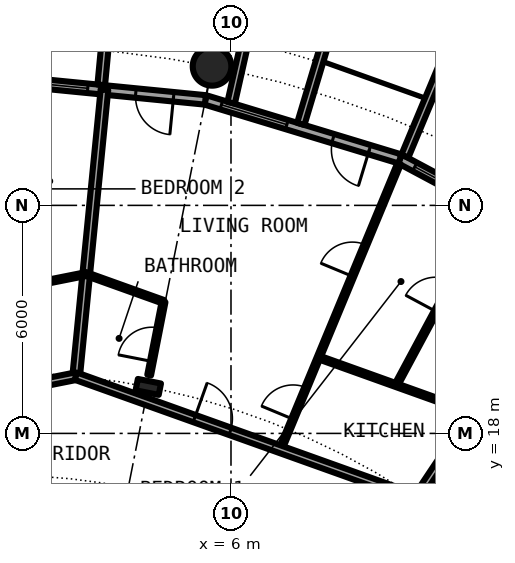
"""IFC4 building model, lengths in metres.
Left out: names, types, materials, properties, quantities, classifications, styles, units other than length and angle.
Written with IfcOpenShell. Run it as: python <this file> out.ifc"""

import sys

from ifc_helpers import new_model, si_unit, direction, frame, frame_2d, origin, origin_2d, place, context, subcontext, project, spatial, rectangle, hollow_circle, i_section, extrude, element, fill, save


model = new_model("IFC4")
c1 = context("Model", 3, precision=1e-05, world=origin(), true_north=direction((0.0, 1.0)))
c2 = subcontext(c1, "Body", "Model", "MODEL_VIEW")
j1 = project(units=[si_unit("LENGTHUNIT", "METRE"), si_unit("PLANEANGLEUNIT", "RADIAN")], contexts=[c1])
p1 = place(None, origin())
s1 = spatial("IfcSite", under=j1, at=p1, CompositionType="ELEMENT")
p2 = place(p1, origin())
s2 = spatial("IfcBuilding", under=s1, at=p2, CompositionType="ELEMENT")
p3 = place(p2, frame((0.0, 0.0, 35.0)))
s3 = spatial("IfcBuildingStorey", under=s2, at=p3, CompositionType="ELEMENT", Elevation=35.0)
p4 = place(p3, frame((5.501, 27.658, 0.0), z_axis=(0.0, 0.0, 1.0), x_axis=(1.0, 0.0, 0.0)))
e1 = element("IfcColumn", 1, at=p4, inside=s3, PredefinedType="COLUMN", context=c2, shape_type="SweptSolid", body=[
    extrude(hollow_circle(Radius=0.508, WallThickness=0.05, at=origin_2d()), origin(), (0.0, 0.0, 1.0), 3.05),
])
p5 = place(p3, frame((3.824, 19.223, 0.0), z_axis=(0.0, 0.0, 1.0), x_axis=(0.195090322016, 0.980785280403, 0.0)))
e2 = element("IfcColumn", 2, at=p5, inside=s3, PredefinedType="COLUMN", context=c2, shape_type="SweptSolid", body=[
    extrude(i_section(OverallWidth=0.305, OverallDepth=0.62, WebThickness=0.021, FlangeThickness=0.04, FilletRadius=0.027, at=origin_2d()), origin(), (0.0, 0.0, 1.0), 3.05),
])
p6 = place(p3, frame((15.167, 22.699, 0.0), z_axis=(0.0, 0.0, 1.0), x_axis=(-0.881915646801, 0.471407246368, 0.0)))
e3 = element("IfcWall", 3, at=p6, inside=s3, PredefinedType="SOLIDWALL", context=c2, shape_type="SweptSolid", body=[
    extrude(rectangle(XDim=5.352, YDim=0.25, at=frame_2d((2.676, 0.0))), origin(), (0.0, 0.0, 1.0), 2.7),
])
p7 = place(p6, frame((0.841, 0.0, 0.0)))
e4 = element("IfcOpeningElement", 4, at=p7, cuts=e3, PredefinedType="OPENING", context=c2, shape_type="SweptSolid", body=[
    extrude(rectangle(XDim=1.0, YDim=2.2, at=frame_2d((0.5, 1.1))), frame((0.0, 0.135, 0.0), z_axis=(0.0, -1.0, 0.0), x_axis=(1.0, 0.0, 0.0)), (0.0, 0.0, 1.0), 0.27),
])
p8 = place(p6, frame((3.111, 0.0, 0.3)))
e5 = element("IfcOpeningElement", 5, at=p8, cuts=e3, PredefinedType="OPENING", context=c2, shape_type="SweptSolid", body=[
    extrude(rectangle(XDim=1.8, YDim=2.1, at=frame_2d((0.9, 1.05))), frame((0.0, 0.135, 0.0), z_axis=(0.0, -1.0, 0.0), x_axis=(1.0, 0.0, 0.0)), (0.0, 0.0, 1.0), 0.27),
])
p9 = place(p3, frame((10.575, 25.295, -0.03), z_axis=(0.0, 0.0, 1.0), x_axis=(0.385697364644, 0.922625353492, 0.0)))
e6 = element("IfcWall", 6, at=p9, inside=s3, PredefinedType="SOLIDWALL", context=c2, shape_type="SweptSolid", body=[
    extrude(rectangle(XDim=2.883, YDim=0.2, at=frame_2d((1.442, 0.0))), origin(), (0.0, 0.0, 1.0), 2.73),
])
p10 = place(p3, frame((10.447, 25.222, 0.0), z_axis=(0.0, 0.0, 1.0), x_axis=(-0.956965678721, 0.290201119486, 0.0)))
e7 = element("IfcWall", 7, at=p10, inside=s3, PredefinedType="SOLIDWALL", context=c2, shape_type="SweptSolid", body=[
    extrude(rectangle(XDim=5.351, YDim=0.25, at=frame_2d((2.676, 0.0))), origin(), (0.0, 0.0, 1.0), 2.7),
])
p11 = place(p10, frame((0.841, 0.0, 0.0)))
e8 = element("IfcOpeningElement", 8, at=p11, cuts=e7, PredefinedType="OPENING", context=c2, shape_type="SweptSolid", body=[
    extrude(rectangle(XDim=1.0, YDim=2.2, at=frame_2d((0.5, 1.1))), frame((0.0, 0.135, 0.0), z_axis=(0.0, -1.0, 0.0), x_axis=(1.0, 0.0, 0.0)), (0.0, 0.0, 1.0), 0.27),
])
p12 = place(p10, frame((3.111, 0.0, 0.3)))
e9 = element("IfcOpeningElement", 9, at=p12, cuts=e7, PredefinedType="OPENING", context=c2, shape_type="SweptSolid", body=[
    extrude(rectangle(XDim=1.8, YDim=2.1, at=frame_2d((0.9, 1.05))), frame((0.0, 0.135, 0.0), z_axis=(0.0, -1.0, 0.0), x_axis=(1.0, 0.0, 0.0)), (0.0, 0.0, 1.0), 0.27),
])
p13 = place(p3, frame((7.837, 26.144, -0.03), z_axis=(0.0, 0.0, 1.0), x_axis=(0.287064767992, 0.957911174889, 0.0)))
e10 = element("IfcWall", 10, at=p13, inside=s3, PredefinedType="SOLIDWALL", context=c2, shape_type="SweptSolid", body=[
    extrude(rectangle(XDim=3.006, YDim=0.2, at=frame_2d((1.503, 0.0))), origin(), (0.0, 0.0, 1.0), 2.73),
])
p14 = place(p3, frame((6.004, 26.7, -0.03), z_axis=(0.0, 0.0, 1.0), x_axis=(0.219609259383, 0.975587911566, 0.0)))
e11 = element("IfcWall", 11, at=p14, inside=s3, PredefinedType="SOLIDWALL", context=c2, shape_type="SweptSolid", body=[
    extrude(rectangle(XDim=2.933, YDim=0.2, at=frame_2d((1.466, 0.0))), origin(), (0.0, 0.0, 1.0), 2.73),
])
p15 = place(p3, frame((5.326, 26.775, 0.0), z_axis=(0.0, 0.0, 1.0), x_axis=(-0.995173996315, 0.098126026407, 0.0)))
e12 = element("IfcWall", 12, at=p15, inside=s3, PredefinedType="SOLIDWALL", context=c2, shape_type="SweptSolid", body=[
    extrude(rectangle(XDim=5.352, YDim=0.25, at=frame_2d((2.676, 0.0))), origin(), (0.0, 0.0, 1.0), 2.7),
])
p16 = place(p15, frame((0.841, 0.0, 0.0)))
e13 = element("IfcOpeningElement", 13, at=p16, cuts=e12, PredefinedType="OPENING", context=c2, shape_type="SweptSolid", body=[
    extrude(rectangle(XDim=1.0, YDim=2.2, at=frame_2d((0.5, 1.1))), frame((0.0, 0.135, 0.0), z_axis=(0.0, -1.0, 0.0), x_axis=(1.0, 0.0, 0.0)), (0.0, 0.0, 1.0), 0.27),
])
p17 = place(p15, frame((3.111, 0.0, 0.3)))
e14 = element("IfcOpeningElement", 14, at=p17, cuts=e12, PredefinedType="OPENING", context=c2, shape_type="SweptSolid", body=[
    extrude(rectangle(XDim=1.8, YDim=2.1, at=frame_2d((0.9, 1.05))), frame((0.0, 0.135, 0.0), z_axis=(0.0, -1.0, 0.0), x_axis=(1.0, 0.0, 0.0)), (0.0, 0.0, 1.0), 0.27),
])
p18 = place(p3, frame((2.586, 27.171, -0.03), z_axis=(0.0, 0.0, 1.0), x_axis=(0.094548432284, 0.995520262954, 0.0)))
e15 = element("IfcWall", 15, at=p18, inside=s3, PredefinedType="SOLIDWALL", context=c2, shape_type="SweptSolid", body=[
    extrude(rectangle(XDim=3.006, YDim=0.2, at=frame_2d((1.503, 0.0))), origin(), (0.0, 0.0, 1.0), 2.73),
])
p19 = place(p3, frame((1.926, 19.505, 0.0), z_axis=(0.0, 0.0, 1.0), x_axis=(0.098208010272, 0.995165909142, 0.0)))
e16 = element("IfcWall", 16, at=p19, inside=s3, PredefinedType="PARTITIONING", context=c2, shape_type="SweptSolid", body=[
    extrude(rectangle(XDim=7.575, YDim=0.2, at=frame_2d((3.787, 0.0))), origin(), (0.0, 0.0, 1.0), 2.7),
])
p20 = place(p3, frame((3.847, 19.535, 0.0), z_axis=(0.0, 0.0, 1.0), x_axis=(0.193055213522, 0.981187894611, 0.0)))
e17 = element("IfcWall", 17, at=p20, inside=s3, PredefinedType="PARTITIONING", context=c2, shape_type="SweptSolid", body=[
    extrude(rectangle(XDim=1.964, YDim=0.1, at=frame_2d((0.982, 0.0))), origin(), (0.0, 0.0, 1.0), 2.7),
])
p21 = place(p20, frame((0.366, 0.0, 0.0)))
e18 = element("IfcOpeningElement", 18, at=p21, cuts=e17, PredefinedType="OPENING", context=c2, shape_type="SweptSolid", body=[
    extrude(rectangle(XDim=0.9, YDim=2.3, at=frame_2d((0.45, 1.15))), frame((0.0, 0.06, 0.0), z_axis=(0.0, -1.0, 0.0), x_axis=(1.0, 0.0, 0.0)), (0.0, 0.0, 1.0), 0.12),
])
p22 = place(p3, frame((7.302, 17.58, 0.0), z_axis=(0.0, 0.0, 1.0), x_axis=(0.383616168183, 0.923492628833, 0.0)))
e19 = element("IfcWall", 19, at=p22, inside=s3, PredefinedType="PARTITIONING", context=c2, shape_type="SweptSolid", body=[
    extrude(rectangle(XDim=8.138, YDim=0.1, at=frame_2d((4.069, 0.0))), origin(), (0.0, 0.0, 1.0), 2.7),
])
p23 = place(p22, frame((0.861, 0.0, 0.0)))
e20 = element("IfcOpeningElement", 20, at=p23, cuts=e19, PredefinedType="OPENING", context=c2, shape_type="SweptSolid", body=[
    extrude(rectangle(XDim=0.9, YDim=2.3, at=frame_2d((0.45, 1.15))), frame((0.0, 0.06, 0.0), z_axis=(0.0, -1.0, 0.0), x_axis=(1.0, 0.0, 0.0)), (0.0, 0.0, 1.0), 0.12),
])
p24 = place(p22, frame((4.931, 0.0, 0.0)))
e21 = element("IfcOpeningElement", 21, at=p24, cuts=e19, PredefinedType="OPENING", context=c2, shape_type="SweptSolid", body=[
    extrude(rectangle(XDim=0.9, YDim=2.3, at=frame_2d((0.45, 1.15))), frame((0.0, 0.06, 0.0), z_axis=(0.0, -1.0, 0.0), x_axis=(1.0, 0.0, 0.0)), (0.0, 0.0, 1.0), 0.12),
])
p25 = place(p3, frame((10.349, 19.272, 0.0), z_axis=(0.0, 0.0, 1.0), x_axis=(0.472967735543, 0.881079747319, 0.0)))
e22 = element("IfcWall", 22, at=p25, inside=s3, PredefinedType="PARTITIONING", context=c2, shape_type="SweptSolid", body=[
    extrude(rectangle(XDim=5.3, YDim=0.1, at=frame_2d((2.65, 0.0))), origin(), (0.0, 0.0, 1.0), 2.7),
])
p26 = place(p25, frame((2.2, 0.0, 0.0)))
e23 = element("IfcOpeningElement", 23, at=p26, cuts=e22, PredefinedType="OPENING", context=c2, shape_type="SweptSolid", body=[
    extrude(rectangle(XDim=0.9, YDim=2.3, at=frame_2d((0.45, 1.15))), frame((0.0, 0.06, 0.0), z_axis=(0.0, -1.0, 0.0), x_axis=(1.0, 0.0, 0.0)), (0.0, 0.0, 1.0), 0.12),
])
p27 = place(p3, frame((11.061, 16.555, 0.0), z_axis=(0.0, 0.0, 1.0), x_axis=(0.555576285599, 0.831465568067, 0.0)))
e24 = element("IfcWall", 24, at=p27, inside=s3, PredefinedType="PARTITIONING", context=c2, shape_type="SweptSolid", body=[
    extrude(rectangle(XDim=7.264, YDim=0.2, at=frame_2d((3.632, 0.0))), origin(), (0.0, 0.0, 1.0), 2.7),
])
p28 = place(p3, frame((-9.239, 17.286, 0.0), z_axis=(0.0, 0.0, 1.0), x_axis=(0.98077905287, 0.195121627328, 0.0)))
e25 = element("IfcWall", 25, at=p28, inside=s3, PredefinedType="PARTITIONING", context=c2, shape_type="SweptSolid", body=[
    extrude(rectangle(XDim=11.379, YDim=0.2, at=frame_2d((5.689, 0.0))), origin(), (0.0, 0.0, 1.0), 2.38),
])
p29 = place(p28, frame((3.293, 0.0, 0.0)))
e26 = element("IfcOpeningElement", 26, at=p29, cuts=e25, PredefinedType="OPENING", context=c2, shape_type="SweptSolid", body=[
    extrude(rectangle(XDim=1.0, YDim=2.3, at=frame_2d((0.5, 1.15))), frame((0.0, 0.11, 0.0), z_axis=(0.0, -1.0, 0.0), x_axis=(1.0, 0.0, 0.0)), (0.0, 0.0, 1.0), 0.22),
])
p30 = place(p3, frame((1.918, 19.506, 0.0), z_axis=(0.0, 0.0, 1.0), x_axis=(0.941574977747, -0.336803446065, 0.0)))
e27 = element("IfcWall", 27, at=p30, inside=s3, PredefinedType="PARTITIONING", context=c2, shape_type="SweptSolid", body=[
    extrude(rectangle(XDim=9.37, YDim=0.2, at=frame_2d((4.685, 0.0))), origin(), (0.0, 0.0, 1.0), 2.38),
])
p31 = place(p30, frame((3.313, 0.0, 0.0)))
e28 = element("IfcOpeningElement", 28, at=p31, cuts=e27, PredefinedType="OPENING", context=c2, shape_type="SweptSolid", body=[
    extrude(rectangle(XDim=1.0, YDim=2.3, at=frame_2d((0.5, 1.15))), frame((0.0, 0.11, 0.0), z_axis=(0.0, -1.0, 0.0), x_axis=(1.0, 0.0, 0.0)), (0.0, 0.0, 1.0), 0.22),
])
p32 = place(p3, frame((-4.163, 20.93, 0.0), z_axis=(0.0, 0.0, 1.0), x_axis=(0.98077745026, 0.195129682675, 0.0)))
e29 = element("IfcWall", 29, at=p32, inside=s3, PredefinedType="PARTITIONING", context=c2, shape_type="SweptSolid", body=[
    extrude(rectangle(XDim=6.474, YDim=0.1, at=frame_2d((3.237, 0.0))), origin(), (0.0, 0.0, 1.0), 2.7),
])
p33 = place(p3, frame((2.186, 22.193, 0.0), z_axis=(0.0, 0.0, 1.0), x_axis=(0.941358984217, -0.337406672777, 0.0)))
e30 = element("IfcWall", 30, at=p33, inside=s3, PredefinedType="PARTITIONING", context=c2, shape_type="SweptSolid", body=[
    extrude(rectangle(XDim=2.167, YDim=0.1, at=frame_2d((1.083, 0.0))), origin(), (0.0, 0.0, 1.0), 2.7),
])
p34 = place(p3, frame((8.318, 19.996, 0.0), z_axis=(0.0, 0.0, 1.0), x_axis=(0.941370462946, -0.337374645598, 0.0)))
e31 = element("IfcWall", 31, at=p34, inside=s3, PredefinedType="PARTITIONING", context=c2, shape_type="SweptSolid", body=[
    extrude(rectangle(XDim=4.334, YDim=0.1, at=frame_2d((2.167, 0.0))), origin(), (0.0, 0.0, 1.0), 2.7),
])
p35 = place(p8, origin())
e32 = element("IfcWindow", 32, at=p35, inside=s3, PartitioningType="SINGLE_PANEL", PredefinedType="WINDOW", context=c2, shape_type="SweptSolid", body=[
    extrude(rectangle(XDim=1.8, YDim=2.1, at=frame_2d((0.9, 1.05))), frame((0.0, 0.03, 0.0), z_axis=(0.0, -1.0, 0.0), x_axis=(1.0, 0.0, 0.0)), (0.0, 0.0, 1.0), 0.06),
])
fill(e5, e32)
p36 = place(p11, origin())
e33 = element("IfcDoor", 33, at=p36, inside=s3, OperationType="SINGLE_SWING_LEFT", PredefinedType="DOOR", context=c2, shape_type="SweptSolid", body=[
    extrude(rectangle(XDim=1.0, YDim=2.2, at=frame_2d((0.5, 1.1))), frame((0.0, 0.025, 0.0), z_axis=(0.0, -1.0, 0.0), x_axis=(1.0, 0.0, 0.0)), (0.0, 0.0, 1.0), 0.05),
])
fill(e8, e33)
p37 = place(p12, origin())
e34 = element("IfcWindow", 34, at=p37, inside=s3, PartitioningType="SINGLE_PANEL", PredefinedType="WINDOW", context=c2, shape_type="SweptSolid", body=[
    extrude(rectangle(XDim=1.8, YDim=2.1, at=frame_2d((0.9, 1.05))), frame((0.0, 0.03, 0.0), z_axis=(0.0, -1.0, 0.0), x_axis=(1.0, 0.0, 0.0)), (0.0, 0.0, 1.0), 0.06),
])
fill(e9, e34)
p38 = place(p16, origin())
e35 = element("IfcDoor", 35, at=p38, inside=s3, OperationType="SINGLE_SWING_LEFT", PredefinedType="DOOR", context=c2, shape_type="SweptSolid", body=[
    extrude(rectangle(XDim=1.0, YDim=2.2, at=frame_2d((0.5, 1.1))), frame((0.0, 0.025, 0.0), z_axis=(0.0, -1.0, 0.0), x_axis=(1.0, 0.0, 0.0)), (0.0, 0.0, 1.0), 0.05),
])
fill(e13, e35)
p39 = place(p17, origin())
e36 = element("IfcWindow", 36, at=p39, inside=s3, PartitioningType="SINGLE_PANEL", PredefinedType="WINDOW", context=c2, shape_type="SweptSolid", body=[
    extrude(rectangle(XDim=1.8, YDim=2.1, at=frame_2d((0.9, 1.05))), frame((0.0, 0.03, 0.0), z_axis=(0.0, -1.0, 0.0), x_axis=(1.0, 0.0, 0.0)), (0.0, 0.0, 1.0), 0.06),
])
fill(e14, e36)
p40 = place(p31, origin())
e37 = element("IfcDoor", 37, at=p40, inside=s3, OperationType="SINGLE_SWING_LEFT", PredefinedType="DOOR", context=c2, shape_type="SweptSolid", body=[
    extrude(rectangle(XDim=1.0, YDim=2.3, at=frame_2d((0.5, 1.15))), frame((0.0, 0.025, 0.0), z_axis=(0.0, -1.0, 0.0), x_axis=(1.0, 0.0, 0.0)), (0.0, 0.0, 1.0), 0.05),
])
fill(e28, e37)
p41 = place(p21, origin())
e38 = element("IfcDoor", 38, at=p41, inside=s3, OperationType="SINGLE_SWING_LEFT", PredefinedType="DOOR", context=c2, shape_type="SweptSolid", body=[
    extrude(rectangle(XDim=0.9, YDim=2.3, at=frame_2d((0.45, 1.15))), frame((0.0, 0.025, 0.0), z_axis=(0.0, -1.0, 0.0), x_axis=(1.0, 0.0, 0.0)), (0.0, 0.0, 1.0), 0.05),
])
fill(e18, e38)
p42 = place(p23, origin())
e39 = element("IfcDoor", 39, at=p42, inside=s3, OperationType="SINGLE_SWING_LEFT", PredefinedType="DOOR", context=c2, shape_type="SweptSolid", body=[
    extrude(rectangle(XDim=0.9, YDim=2.3, at=frame_2d((0.45, 1.15))), frame((0.0, 0.025, 0.0), z_axis=(0.0, -1.0, 0.0), x_axis=(1.0, 0.0, 0.0)), (0.0, 0.0, 1.0), 0.05),
])
fill(e20, e39)
p43 = place(p24, origin())
e40 = element("IfcDoor", 40, at=p43, inside=s3, OperationType="SINGLE_SWING_RIGHT", PredefinedType="DOOR", context=c2, shape_type="SweptSolid", body=[
    extrude(rectangle(XDim=0.9, YDim=2.3, at=frame_2d((0.45, 1.15))), frame((0.0, 0.025, 0.0), z_axis=(0.0, -1.0, 0.0), x_axis=(1.0, 0.0, 0.0)), (0.0, 0.0, 1.0), 0.05),
])
fill(e21, e40)
p44 = place(p26, origin())
e41 = element("IfcDoor", 41, at=p44, inside=s3, OperationType="SINGLE_SWING_RIGHT", PredefinedType="DOOR", context=c2, shape_type="SweptSolid", body=[
    extrude(rectangle(XDim=0.9, YDim=2.3, at=frame_2d((0.45, 1.15))), frame((0.0, 0.025, 0.0), z_axis=(0.0, -1.0, 0.0), x_axis=(1.0, 0.0, 0.0)), (0.0, 0.0, 1.0), 0.05),
])
fill(e23, e41)
save(model, sys.argv[1])
